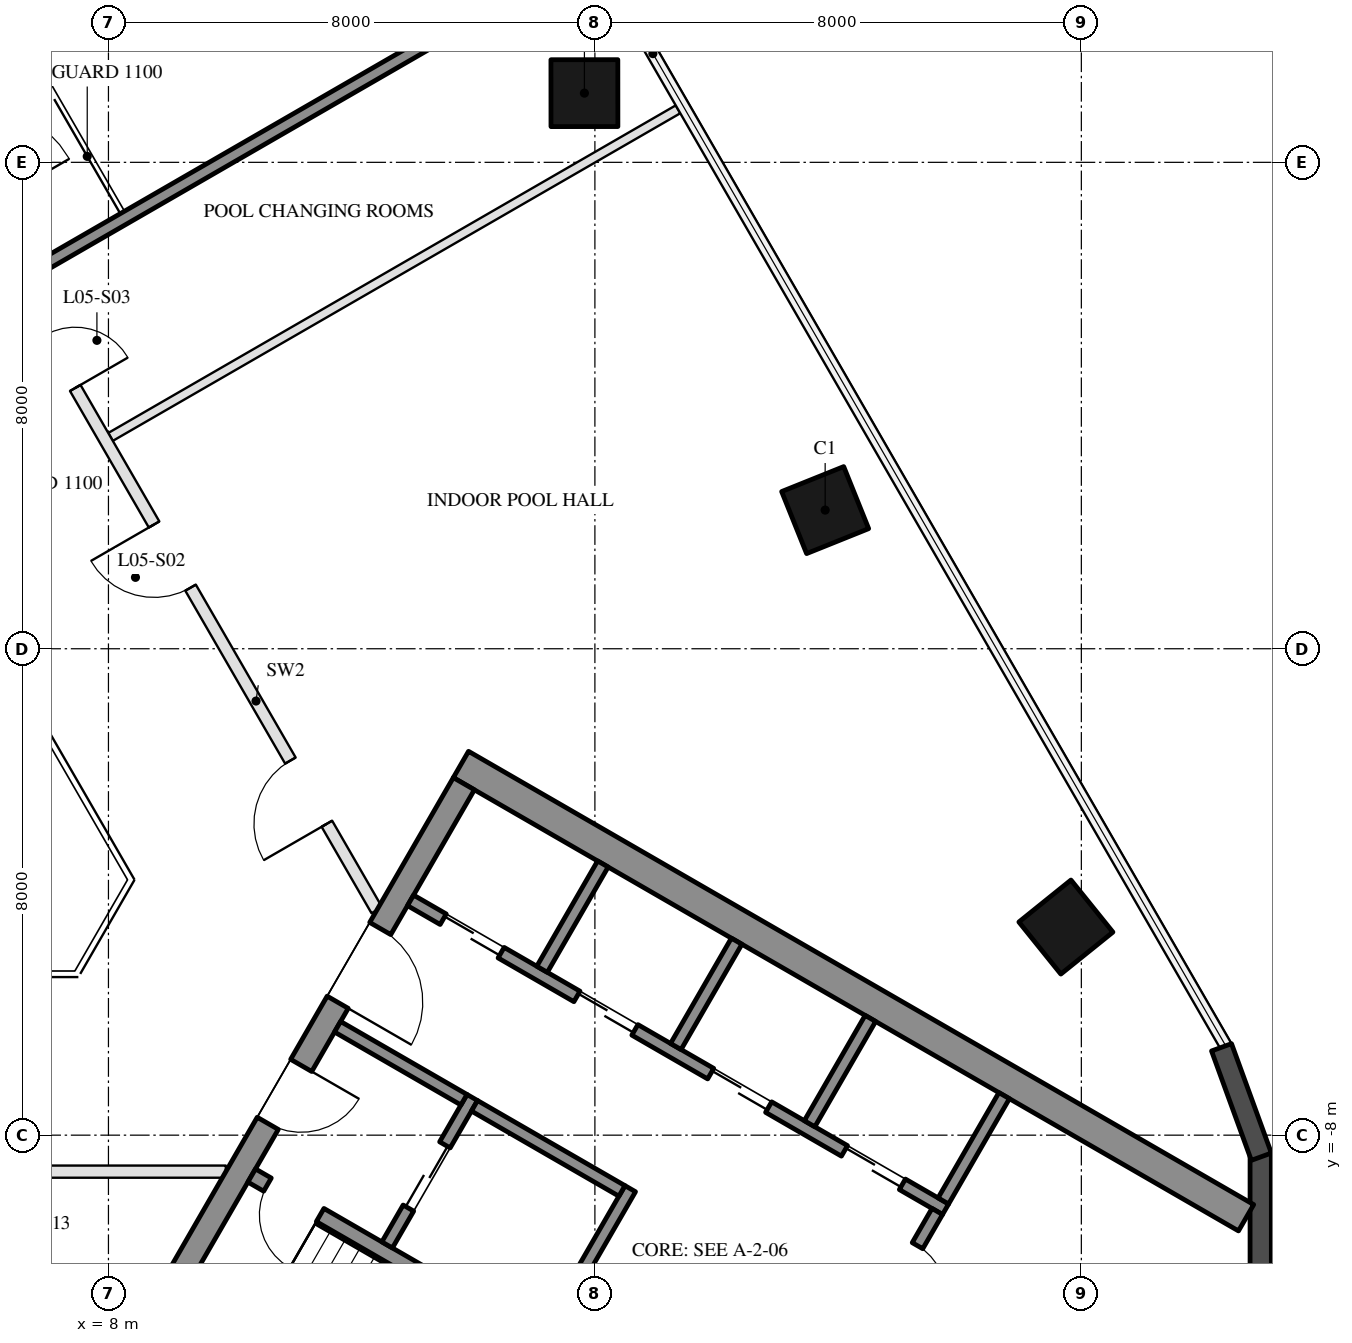
"""IFC4 building model, lengths in metres.
Left out: names, types, materials, properties, quantities, classifications, styles, units other than length and angle.
Written with IfcOpenShell. Run it as: python <this file> out.ifc"""

import sys

from ifc_helpers import new_model, si_unit, direction, frame, frame_2d, origin, origin_2d, place, context, subcontext, project, spatial, rectangle, hollow_rectangle, extrude, boolean, halfspace, element, fill, save


model = new_model("IFC4")
c1 = context("Model", 3, precision=1e-05, world=origin(), true_north=direction((0.0, 1.0)))
c2 = subcontext(c1, "Body", "Model", "MODEL_VIEW")
j1 = project(units=[si_unit("LENGTHUNIT", "METRE"), si_unit("PLANEANGLEUNIT", "RADIAN")], contexts=[c1])
p1 = place(None, origin())
s1 = spatial("IfcSite", under=j1, at=p1, CompositionType="ELEMENT")
p2 = place(p1, origin())
s2 = spatial("IfcBuilding", under=s1, at=p2, CompositionType="ELEMENT")
p3 = place(p2, frame((0.0, 0.0, 33.0)))
s3 = spatial("IfcBuildingStorey", under=s2, at=p3, CompositionType="ELEMENT", Elevation=33.0)
p4 = place(p3, frame((23.746, -4.577, 0.0), z_axis=(-0.01301970202, 0.00206145282, 0.999913115111), x_axis=(0.497599356322, -0.867367587298, 0.008267351011)))
e1 = element("IfcColumn", 1, at=p4, inside=s3, PredefinedType="COLUMN", context=c2, shape_type="SweptSolid", body=[
    boolean("DIFFERENCE", boolean("DIFFERENCE", extrude(hollow_rectangle(XDim=1.1, YDim=1.1, WallThickness=0.05, at=origin_2d()), origin(), (0.0, 0.0, 1.0), 4.5), halfspace(frame((0.0, 0.0, 0.012), z_axis=(0.0, 0.0, 1.0), x_axis=(1.0, 0.0, 0.0)), True)), halfspace(frame((0.0, 0.0, 4.493), z_axis=(0.0, 0.0, 1.0), x_axis=(1.0, 0.0, 0.0)), False)),
])
p5 = place(p3, frame((19.787, 2.281, 0.0), z_axis=(-0.010958529764, -0.001573254273, 0.99993871587), x_axis=(0.501077464826, -0.865392580649, 0.004129842831)))
e2 = element("IfcColumn", 2, at=p5, inside=s3, PredefinedType="COLUMN", context=c2, shape_type="SweptSolid", body=[
    boolean("DIFFERENCE", boolean("DIFFERENCE", extrude(hollow_rectangle(XDim=1.1, YDim=1.1, WallThickness=0.05, at=origin_2d()), origin(), (0.0, 0.0, 1.0), 4.5), halfspace(frame((0.0, 0.0, 0.01), z_axis=(0.0, 0.0, 1.0), x_axis=(1.0, 0.0, 0.0)), True)), halfspace(frame((0.0, 0.0, 4.494), z_axis=(0.0, 0.0, 1.0), x_axis=(1.0, 0.0, 0.0)), False)),
])
p6 = place(p3, frame((15.827, 9.138, 0.0), z_axis=(-0.008842855216, -0.005099560677, 0.999947897839), x_axis=(0.500158591732, -0.865933821414, 6.948309e-06)))
e3 = element("IfcColumn", 3, at=p6, inside=s3, PredefinedType="COLUMN", context=c2, shape_type="SweptSolid", body=[
    boolean("DIFFERENCE", boolean("DIFFERENCE", extrude(hollow_rectangle(XDim=1.1, YDim=1.1, WallThickness=0.05, at=origin_2d()), origin(), (0.0, 0.0, 1.0), 4.5), halfspace(frame((0.0, 0.0, 0.01), z_axis=(0.0, 0.0, 1.0), x_axis=(1.0, 0.0, 0.0)), True)), halfspace(frame((0.0, 0.0, 4.494), z_axis=(0.0, 0.0, 1.0), x_axis=(1.0, 0.0, 0.0)), False)),
])
for number, where, z_axis, x_axis in (
    (4, (26.305, -11.948, 0.0), (0.0, 0.0, 1.0), (0.342, 0.94, 0.0)),
    (5, (26.95, -10.209, 0.0), (0.0, 0.0, 1.0), (0.0, 1.0, 0.0)),
    (6, (26.96, -8.354, 0.0), (0.0, 0.0, 1.0), (-0.342, 0.94, 0.0)),
):
    element("IfcWall", number, at=place(p3, frame(where, z_axis=z_axis, x_axis=x_axis)), inside=s3, PredefinedType="SOLIDWALL", context=c2, shape_type="SweptSolid", body=[
        extrude(rectangle(XDim=1.915, YDim=0.35, at=frame_2d((0.957, 0.0))), origin(), (0.0, 0.0, 1.0), 4.2),
    ])
p7 = place(p3, frame((13.797, -1.903, 0.0), z_axis=(0.0, 0.0, 1.0), x_axis=(0.866025798973, -0.499999315512, 0.0)))
e7 = element("IfcWall", 7, at=p7, inside=s3, PredefinedType="SHEAR", context=c2, shape_type="SweptSolid", body=[
    extrude(rectangle(XDim=14.91, YDim=0.5, at=frame_2d((7.455, 0.0))), origin(), (0.0, 0.0, 1.0), 4.2),
])
p8 = place(p3, frame((8.845, -10.88, 0.0), z_axis=(0.0, 0.0, 1.0), x_axis=(0.500004234368, 0.866022959057, 0.0)))
e8 = element("IfcWall", 8, at=p8, inside=s3, PredefinedType="SHEAR", context=c2, shape_type="SweptSolid", body=[
    extrude(rectangle(XDim=10.0, YDim=0.4, at=frame_2d((5.0, 0.0))), origin(), (0.0, 0.0, 1.0), 4.2),
])
p9 = place(p8, frame((3.55, 0.0, 0.0)))
e9 = element("IfcOpeningElement", 9, at=p9, cuts=e8, PredefinedType="OPENING", context=c2, shape_type="SweptSolid", body=[
    extrude(rectangle(XDim=1.1, YDim=2.1, at=frame_2d((0.55, 1.05))), frame((0.0, 0.21, 0.0), z_axis=(0.0, -1.0, 0.0), x_axis=(1.0, 0.0, 0.0)), (0.0, 0.0, 1.0), 0.42),
])
p10 = place(p8, frame((5.85, 0.0, 0.0)))
e10 = element("IfcOpeningElement", 10, at=p10, cuts=e8, PredefinedType="OPENING", context=c2, shape_type="SweptSolid", body=[
    extrude(rectangle(XDim=1.4, YDim=2.1, at=frame_2d((0.7, 1.05))), frame((0.0, 0.21, 0.0), z_axis=(0.0, -1.0, 0.0), x_axis=(1.0, 0.0, 0.0)), (0.0, 0.0, 1.0), 0.42),
])
p11 = place(p3, frame((10.356, -8.664, 0.0), z_axis=(0.0, 0.0, 1.0), x_axis=(0.866028629588, -0.499994412703, 0.0)))
e11 = element("IfcWall", 11, at=p11, inside=s3, PredefinedType="SHEAR", context=c2, shape_type="SweptSolid", body=[
    extrude(rectangle(XDim=6.45, YDim=0.25, at=frame_2d((3.225, 0.0))), origin(), (0.0, 0.0, 1.0), 4.2),
])
p12 = place(p11, frame((0.3, 0.0, 0.0)))
e12 = element("IfcOpeningElement", 12, at=p12, cuts=e11, PredefinedType="OPENING", context=c2, shape_type="SweptSolid", body=[
    extrude(rectangle(XDim=1.0, YDim=2.1, at=frame_2d((0.5, 1.05))), frame((0.0, 0.135, 0.0), z_axis=(0.0, -1.0, 0.0), x_axis=(1.0, 0.0, 0.0)), (0.0, 0.0, 1.0), 0.27),
])
p13 = place(p3, frame((15.181, -11.305, 0.0), z_axis=(0.0, 0.0, 1.0), x_axis=(0.49994636267, 0.866056369097, 0.0)))
e13 = element("IfcWall", 13, at=p13, inside=s3, PredefinedType="SHEAR", context=c2, shape_type="SweptSolid", body=[
    extrude(rectangle(XDim=2.8, YDim=0.2, at=frame_2d((1.4, 0.0))), origin(), (0.0, 0.0, 1.0), 4.2),
])
p14 = place(p3, frame((12.583, -9.805, 0.0), z_axis=(0.0, 0.0, 1.0), x_axis=(0.49994636267, 0.866056369097, 0.0)))
e14 = element("IfcWall", 14, at=p14, inside=s3, PredefinedType="SHEAR", context=c2, shape_type="SweptSolid", body=[
    extrude(rectangle(XDim=2.8, YDim=0.2, at=frame_2d((1.4, 0.0))), origin(), (0.0, 0.0, 1.0), 4.2),
])
p15 = place(p14, frame((0.7, 0.0, 0.0)))
e15 = element("IfcOpeningElement", 15, at=p15, cuts=e14, PredefinedType="OPENING", context=c2, shape_type="SweptSolid", body=[
    extrude(rectangle(XDim=1.2, YDim=2.1, at=frame_2d((0.6, 1.05))), frame((0.0, 0.11, 0.0), z_axis=(0.0, -1.0, 0.0), x_axis=(1.0, 0.0, 0.0)), (0.0, 0.0, 1.0), 0.22),
])
p16 = place(p3, frame((11.768, -6.217, 0.0), z_axis=(0.0, 0.0, 1.0), x_axis=(0.866050077142, -0.499957262057, 0.0)))
e16 = element("IfcWall", 16, at=p16, inside=s3, PredefinedType="SHEAR", context=c2, shape_type="SweptSolid", body=[
    extrude(rectangle(XDim=2.4, YDim=0.2, at=frame_2d((1.2, 0.0))), origin(), (0.0, 0.0, 1.0), 4.2),
])
p17 = place(p3, frame((14.02, -7.517, 0.0), z_axis=(0.0, 0.0, 1.0), x_axis=(0.866034573852, -0.49998411664, 0.0)))
e17 = element("IfcWall", 17, at=p17, inside=s3, PredefinedType="SHEAR", context=c2, shape_type="SweptSolid", body=[
    extrude(rectangle(XDim=2.8, YDim=0.2, at=frame_2d((1.4, 0.0))), origin(), (0.0, 0.0, 1.0), 4.2),
])
p18 = place(p3, frame((12.968, -4.138, 0.0), z_axis=(0.0, 0.0, 1.0), x_axis=(0.866028328073, -0.49999493495, 0.0)))
e18 = element("IfcWall", 18, at=p18, inside=s3, PredefinedType="SHEAR", context=c2, shape_type="SweptSolid", body=[
    extrude(rectangle(XDim=10.16, YDim=0.2, at=frame_2d((5.08, 0.0))), origin(), (0.0, 0.0, 1.0), 4.2),
])
p19 = place(p18, frame((0.62, 0.0, 0.0)))
e19 = element("IfcOpeningElement", 19, at=p19, cuts=e18, PredefinedType="OPENING", context=c2, shape_type="SweptSolid", body=[
    extrude(rectangle(XDim=1.1, YDim=2.1, at=frame_2d((0.55, 1.05))), frame((0.0, 0.11, 0.0), z_axis=(0.0, -1.0, 0.0), x_axis=(1.0, 0.0, 0.0)), (0.0, 0.0, 1.0), 0.22),
])
p20 = place(p18, frame((3.16, 0.0, 0.0)))
e20 = element("IfcOpeningElement", 20, at=p20, cuts=e18, PredefinedType="OPENING", context=c2, shape_type="SweptSolid", body=[
    extrude(rectangle(XDim=1.1, YDim=2.1, at=frame_2d((0.55, 1.05))), frame((0.0, 0.11, 0.0), z_axis=(0.0, -1.0, 0.0), x_axis=(1.0, 0.0, 0.0)), (0.0, 0.0, 1.0), 0.22),
])
p21 = place(p18, frame((5.7, 0.0, 0.0)))
e21 = element("IfcOpeningElement", 21, at=p21, cuts=e18, PredefinedType="OPENING", context=c2, shape_type="SweptSolid", body=[
    extrude(rectangle(XDim=1.1, YDim=2.1, at=frame_2d((0.55, 1.05))), frame((0.0, 0.11, 0.0), z_axis=(0.0, -1.0, 0.0), x_axis=(1.0, 0.0, 0.0)), (0.0, 0.0, 1.0), 0.22),
])
p22 = place(p18, frame((8.24, 0.0, 0.0)))
e22 = element("IfcOpeningElement", 22, at=p22, cuts=e18, PredefinedType="OPENING", context=c2, shape_type="SweptSolid", body=[
    extrude(rectangle(XDim=1.1, YDim=2.1, at=frame_2d((0.55, 1.05))), frame((0.0, 0.11, 0.0), z_axis=(0.0, -1.0, 0.0), x_axis=(1.0, 0.0, 0.0)), (0.0, 0.0, 1.0), 0.22),
])
p23 = place(p3, frame((20.43, -11.333, 0.0), z_axis=(0.0, 0.0, 1.0), x_axis=(0.500001309137, 0.866024647952, 0.0)))
e23 = element("IfcWall", 23, at=p23, inside=s3, PredefinedType="SHEAR", context=c2, shape_type="SweptSolid", body=[
    extrude(rectangle(XDim=2.4, YDim=0.2, at=frame_2d((1.2, 0.0))), origin(), (0.0, 0.0, 1.0), 4.2),
])
p24 = place(p23, frame((0.85, 0.0, 0.0)))
e24 = element("IfcOpeningElement", 24, at=p24, cuts=e23, PredefinedType="OPENING", context=c2, shape_type="SweptSolid", body=[
    extrude(rectangle(XDim=0.9, YDim=2.1, at=frame_2d((0.45, 1.05))), frame((0.0, 0.11, 0.0), z_axis=(0.0, -1.0, 0.0), x_axis=(1.0, 0.0, 0.0)), (0.0, 0.0, 1.0), 0.22),
])
for number, where, z_axis, x_axis in (
    (25, (15.131, -5.272, 0.0), (0.0, 0.0, 1.0), (0.5, 0.866, 0.0)),
    (26, (17.331, -6.542, 0.0), (0.0, 0.0, 1.0), (0.5, 0.866, 0.0)),
    (27, (19.531, -7.812, 0.0), (0.0, 0.0, 1.0), (0.5, 0.866, 0.0)),
    (28, (21.73, -9.082, 0.0), (0.0, 0.0, 1.0), (0.5, 0.866, 0.0)),
):
    element("IfcWall", number, at=place(p3, frame(where, z_axis=z_axis, x_axis=x_axis)), inside=s3, PredefinedType="SHEAR", context=c2, shape_type="SweptSolid", body=[
        extrude(rectangle(XDim=2.0, YDim=0.2, at=frame_2d((1.0, 0.0))), origin(), (0.0, 0.0, 1.0), 4.2),
    ])
p25 = place(p3, frame((-9.93, -8.6, 0.0), z_axis=(0.0, 0.0, 1.0), x_axis=(1.0, 0.0, 0.0)))
e29 = element("IfcWall", 29, at=p25, inside=s3, PredefinedType="PARTITIONING", context=c2, shape_type="SweptSolid", body=[
    extrude(rectangle(XDim=19.861, YDim=0.2, at=frame_2d((9.93, 0.0))), origin(), (0.0, 0.0, 1.0), 3.41),
])
p26 = place(p25, frame((2.234, 0.0, 0.0)))
e30 = element("IfcOpeningElement", 30, at=p26, cuts=e29, PredefinedType="OPENING", context=c2, shape_type="SweptSolid", body=[
    extrude(rectangle(XDim=1.5, YDim=2.1, at=frame_2d((0.75, 1.05))), frame((0.0, 0.11, 0.0), z_axis=(0.0, -1.0, 0.0), x_axis=(1.0, 0.0, 0.0)), (0.0, 0.0, 1.0), 0.22),
])
p27 = place(p25, frame((12.278, 0.0, 0.0)))
e31 = element("IfcOpeningElement", 31, at=p27, cuts=e29, PredefinedType="OPENING", context=c2, shape_type="SweptSolid", body=[
    extrude(rectangle(XDim=1.2, YDim=2.1, at=frame_2d((0.6, 1.05))), frame((0.0, 0.11, 0.0), z_axis=(0.0, -1.0, 0.0), x_axis=(1.0, 0.0, 0.0)), (0.0, 0.0, 1.0), 0.22),
])
p28 = place(p3, frame((17.367, 8.872, 0.0), z_axis=(0.0, 0.0, 1.0), x_axis=(-0.866017693218, -0.500013354855, 0.0)))
e32 = element("IfcWall", 32, at=p28, inside=s3, PredefinedType="PARTITIONING", context=c2, shape_type="SweptSolid", body=[
    extrude(rectangle(XDim=10.776, YDim=0.15, at=frame_2d((5.388, 0.0))), origin(), (0.0, 0.0, 1.0), 4.2),
])
p29 = place(p3, frame((15.867, 11.47, 0.0), z_axis=(0.0, 0.0, 1.0), x_axis=(-0.866017693218, -0.500013354855, 0.0)))
e33 = element("IfcWall", 33, at=p29, inside=s3, PredefinedType="SOLIDWALL", context=c2, shape_type="SweptSolid", body=[
    extrude(rectangle(XDim=10.776, YDim=0.2, at=frame_2d((5.388, 0.0))), origin(), (0.0, 0.0, 1.0), 4.2),
])
p30 = place(p3, frame((13.667, 15.281, 0.0), z_axis=(0.0, 0.0, 1.0), x_axis=(-0.866027503583, -0.499996363024, 0.0)))
e34 = element("IfcWall", 34, at=p30, inside=s3, PredefinedType="SOLIDWALL", context=c2, shape_type="SweptSolid", body=[
    extrude(rectangle(XDim=10.776, YDim=0.2, at=frame_2d((5.388, 0.0))), origin(), (0.0, 0.0, 1.0), 4.2),
])
p31 = place(p3, frame((12.413, -4.3, 0.0), z_axis=(0.0, 0.0, 1.0), x_axis=(-0.50000478328, 0.866022642139, 0.0)))
e35 = element("IfcWall", 35, at=p31, inside=s3, PredefinedType="PARTITIONING", context=c2, shape_type="SweptSolid", body=[
    extrude(rectangle(XDim=19.861, YDim=0.2, at=frame_2d((9.931, 0.0))), origin(), (0.0, 0.0, 1.0), 3.41),
])
p32 = place(p31, frame((1.642, 0.0, 0.0)))
e36 = element("IfcOpeningElement", 36, at=p32, cuts=e35, PredefinedType="OPENING", context=c2, shape_type="SweptSolid", body=[
    extrude(rectangle(XDim=1.2, YDim=2.1, at=frame_2d((0.6, 1.05))), frame((0.0, 0.11, 0.0), z_axis=(0.0, -1.0, 0.0), x_axis=(1.0, 0.0, 0.0)), (0.0, 0.0, 1.0), 0.22),
])
p33 = place(p31, frame((6.125, 0.0, 0.0)))
e37 = element("IfcOpeningElement", 37, at=p33, cuts=e35, PredefinedType="OPENING", context=c2, shape_type="SweptSolid", body=[
    extrude(rectangle(XDim=1.2, YDim=2.1, at=frame_2d((0.6, 1.05))), frame((0.0, 0.11, 0.0), z_axis=(0.0, -1.0, 0.0), x_axis=(1.0, 0.0, 0.0)), (0.0, 0.0, 1.0), 0.22),
])
p34 = place(p31, frame((9.918, 0.0, 0.0)))
e38 = element("IfcOpeningElement", 38, at=p34, cuts=e35, PredefinedType="OPENING", context=c2, shape_type="SweptSolid", body=[
    extrude(rectangle(XDim=1.0, YDim=2.1, at=frame_2d((0.5, 1.05))), frame((0.0, 0.11, 0.0), z_axis=(0.0, -1.0, 0.0), x_axis=(1.0, 0.0, 0.0)), (0.0, 0.0, 1.0), 0.22),
])
p35 = place(p31, frame((17.34, 0.0, 0.0)))
e39 = element("IfcOpeningElement", 39, at=p35, cuts=e35, PredefinedType="OPENING", context=c2, shape_type="SweptSolid", body=[
    extrude(rectangle(XDim=1.5, YDim=2.1, at=frame_2d((0.75, 1.05))), frame((0.0, 0.11, 0.0), z_axis=(0.0, -1.0, 0.0), x_axis=(1.0, 0.0, 0.0)), (0.0, 0.0, 1.0), 0.22),
])
p36 = place(p31, frame((13.23, 0.0, 0.0)))
e40 = element("IfcOpeningElement", 40, at=p36, cuts=e35, PredefinedType="OPENING", context=c2, shape_type="SweptSolid", body=[
    extrude(rectangle(XDim=1.8, YDim=2.1, at=frame_2d((0.9, 1.05))), frame((0.0, 0.11, 0.0), z_axis=(0.0, -1.0, 0.0), x_axis=(1.0, 0.0, 0.0)), (0.0, 0.0, 1.0), 0.22),
])
p37 = place(p15, origin())
e41 = element("IfcDoor", 41, at=p37, inside=s3, OperationType="DOUBLE_DOOR_SLIDING", PredefinedType="DOOR", context=c2, shape_type="SweptSolid", body=[
    extrude(rectangle(XDim=1.2, YDim=2.1, at=frame_2d((0.6, 1.05))), frame((0.0, 0.025, 0.0), z_axis=(0.0, -1.0, 0.0), x_axis=(1.0, 0.0, 0.0)), (0.0, 0.0, 1.0), 0.05),
])
fill(e15, e41)
p38 = place(p19, origin())
e42 = element("IfcDoor", 42, at=p38, inside=s3, OperationType="DOUBLE_DOOR_SLIDING", PredefinedType="DOOR", context=c2, shape_type="SweptSolid", body=[
    extrude(rectangle(XDim=1.1, YDim=2.1, at=frame_2d((0.55, 1.05))), frame((0.0, 0.025, 0.0), z_axis=(0.0, -1.0, 0.0), x_axis=(1.0, 0.0, 0.0)), (0.0, 0.0, 1.0), 0.05),
])
fill(e19, e42)
p39 = place(p20, origin())
e43 = element("IfcDoor", 43, at=p39, inside=s3, OperationType="DOUBLE_DOOR_SLIDING", PredefinedType="DOOR", context=c2, shape_type="SweptSolid", body=[
    extrude(rectangle(XDim=1.1, YDim=2.1, at=frame_2d((0.55, 1.05))), frame((0.0, 0.025, 0.0), z_axis=(0.0, -1.0, 0.0), x_axis=(1.0, 0.0, 0.0)), (0.0, 0.0, 1.0), 0.05),
])
fill(e20, e43)
p40 = place(p21, origin())
e44 = element("IfcDoor", 44, at=p40, inside=s3, OperationType="DOUBLE_DOOR_SLIDING", PredefinedType="DOOR", context=c2, shape_type="SweptSolid", body=[
    extrude(rectangle(XDim=1.1, YDim=2.1, at=frame_2d((0.55, 1.05))), frame((0.0, 0.025, 0.0), z_axis=(0.0, -1.0, 0.0), x_axis=(1.0, 0.0, 0.0)), (0.0, 0.0, 1.0), 0.05),
])
fill(e21, e44)
p41 = place(p22, origin())
e45 = element("IfcDoor", 45, at=p41, inside=s3, OperationType="DOUBLE_DOOR_SLIDING", PredefinedType="DOOR", context=c2, shape_type="SweptSolid", body=[
    extrude(rectangle(XDim=1.1, YDim=2.1, at=frame_2d((0.55, 1.05))), frame((0.0, 0.025, 0.0), z_axis=(0.0, -1.0, 0.0), x_axis=(1.0, 0.0, 0.0)), (0.0, 0.0, 1.0), 0.05),
])
fill(e22, e45)
p42 = place(p24, frame((0.9, 0.0, 0.0), z_axis=(0.0, 0.0, 1.0), x_axis=(-1.0, 0.0, 0.0)))
e46 = element("IfcDoor", 46, at=p42, inside=s3, OperationType="SINGLE_SWING_RIGHT", PredefinedType="DOOR", context=c2, shape_type="SweptSolid", body=[
    extrude(rectangle(XDim=0.9, YDim=2.1, at=frame_2d((0.45, 1.05))), frame((0.0, 0.025, 0.0), z_axis=(0.0, -1.0, 0.0), x_axis=(1.0, 0.0, 0.0)), (0.0, 0.0, 1.0), 0.05),
])
fill(e24, e46)
p43 = place(p9, frame((1.1, 0.0, 0.0), z_axis=(0.0, 0.0, 1.0), x_axis=(-1.0, 0.0, 0.0)))
e47 = element("IfcDoor", 47, at=p43, inside=s3, OperationType="SINGLE_SWING_LEFT", PredefinedType="DOOR", context=c2, shape_type="SweptSolid", body=[
    extrude(rectangle(XDim=1.1, YDim=2.1, at=frame_2d((0.55, 1.05))), frame((0.0, 0.025, 0.0), z_axis=(0.0, -1.0, 0.0), x_axis=(1.0, 0.0, 0.0)), (0.0, 0.0, 1.0), 0.05),
])
fill(e9, e47)
p44 = place(p10, frame((1.4, 0.0, 0.0), z_axis=(0.0, 0.0, 1.0), x_axis=(-1.0, 0.0, 0.0)))
e48 = element("IfcDoor", 48, at=p44, inside=s3, OperationType="DOUBLE_DOOR_SINGLE_SWING", PredefinedType="DOOR", context=c2, shape_type="SweptSolid", body=[
    extrude(rectangle(XDim=1.4, YDim=2.1, at=frame_2d((0.7, 1.05))), frame((0.0, 0.025, 0.0), z_axis=(0.0, -1.0, 0.0), x_axis=(1.0, 0.0, 0.0)), (0.0, 0.0, 1.0), 0.05),
])
fill(e10, e48)
p45 = place(p12, frame((1.0, 0.0, 0.0), z_axis=(0.0, 0.0, 1.0), x_axis=(-1.0, 0.0, 0.0)))
e49 = element("IfcDoor", 49, at=p45, inside=s3, OperationType="SINGLE_SWING_LEFT", PredefinedType="DOOR", context=c2, shape_type="SweptSolid", body=[
    extrude(rectangle(XDim=1.0, YDim=2.1, at=frame_2d((0.5, 1.05))), frame((0.0, 0.025, 0.0), z_axis=(0.0, -1.0, 0.0), x_axis=(1.0, 0.0, 0.0)), (0.0, 0.0, 1.0), 0.05),
])
fill(e12, e49)
p46 = place(p32, origin())
e50 = element("IfcDoor", 50, at=p46, inside=s3, OperationType="SINGLE_SWING_LEFT", PredefinedType="DOOR", context=c2, shape_type="SweptSolid", body=[
    extrude(rectangle(XDim=1.2, YDim=2.1, at=frame_2d((0.6, 1.05))), frame((0.0, 0.025, 0.0), z_axis=(0.0, -1.0, 0.0), x_axis=(1.0, 0.0, 0.0)), (0.0, 0.0, 1.0), 0.05),
])
fill(e36, e50)
p47 = place(p33, origin())
e51 = element("IfcDoor", 51, at=p47, inside=s3, OperationType="SINGLE_SWING_RIGHT", PredefinedType="DOOR", context=c2, shape_type="SweptSolid", body=[
    extrude(rectangle(XDim=1.2, YDim=2.1, at=frame_2d((0.6, 1.05))), frame((0.0, 0.025, 0.0), z_axis=(0.0, -1.0, 0.0), x_axis=(1.0, 0.0, 0.0)), (0.0, 0.0, 1.0), 0.05),
])
fill(e37, e51)
p48 = place(p34, frame((1.0, 0.0, 0.0), z_axis=(0.0, 0.0, 1.0), x_axis=(-1.0, 0.0, 0.0)))
e52 = element("IfcDoor", 52, at=p48, inside=s3, OperationType="SINGLE_SWING_RIGHT", PredefinedType="DOOR", context=c2, shape_type="SweptSolid", body=[
    extrude(rectangle(XDim=1.0, YDim=2.1, at=frame_2d((0.5, 1.05))), frame((0.0, 0.025, 0.0), z_axis=(0.0, -1.0, 0.0), x_axis=(1.0, 0.0, 0.0)), (0.0, 0.0, 1.0), 0.05),
])
fill(e38, e52)
save(model, sys.argv[1])
